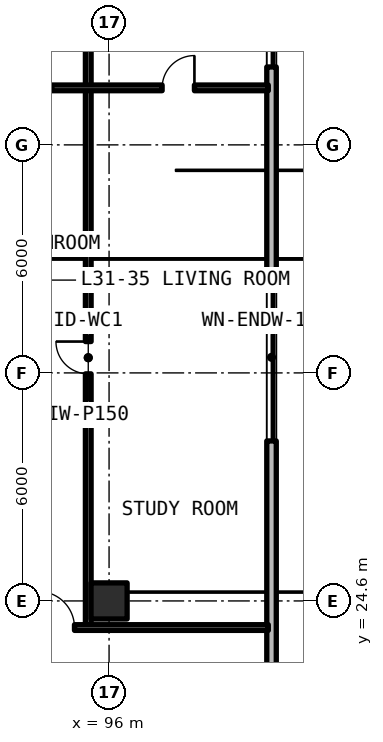
"""IFC4 building model, lengths in metres.
Left out: names, types, materials, properties, quantities, classifications, styles, units other than length and angle.
Written with IfcOpenShell. Run it as: python <this file> out.ifc"""

import sys

from ifc_helpers import new_model, si_unit, direction, frame, frame_2d, origin, origin_2d, place, context, subcontext, project, spatial, rectangle, extrude, element, fill, save


model = new_model("IFC4")
c1 = context("Model", 3, precision=1e-05, world=origin(), true_north=direction((0.0, 1.0)))
c2 = subcontext(c1, "Body", "Model", "MODEL_VIEW")
j1 = project(units=[si_unit("LENGTHUNIT", "METRE"), si_unit("PLANEANGLEUNIT", "RADIAN")], contexts=[c1])
p1 = place(None, origin())
s1 = spatial("IfcSite", under=j1, at=p1, CompositionType="ELEMENT")
p2 = place(p1, origin())
s2 = spatial("IfcBuilding", under=s1, at=p2, CompositionType="ELEMENT")
p3 = place(p2, frame((0.0, 0.0, 112.2)))
s3 = spatial("IfcBuildingStorey", under=s2, at=p3, CompositionType="ELEMENT", Elevation=112.2)
p4 = place(p3, frame((96.0, 24.6, 0.0), z_axis=(0.0, 0.0, 1.0), x_axis=(1.0, 0.0, 0.0)))
e1 = element("IfcColumn", 1, at=p4, inside=s3, PredefinedType="COLUMN", context=c2, shape_type="SweptSolid", body=[
    extrude(rectangle(XDim=0.95, YDim=0.95, at=origin_2d()), origin(), (0.0, 0.0, 1.0), 3.63),
])
p5 = place(p3, frame((100.275, 13.852, 0.0), z_axis=(0.0, 0.0, 1.0), x_axis=(0.0, 1.0, 0.0)))
e2 = element("IfcWall", 2, at=p5, inside=s3, PredefinedType="SOLIDWALL", context=c2, shape_type="SweptSolid", body=[
    extrude(rectangle(XDim=39.496, YDim=0.25, at=frame_2d((19.748, 0.0))), origin(), (0.0, 0.0, 1.0), 3.41),
])
p6 = place(p5, frame((14.958, 0.0, 0.78)))
e3 = element("IfcOpeningElement", 3, at=p6, cuts=e2, PredefinedType="OPENING", context=c2, shape_type="SweptSolid", body=[
    extrude(rectangle(XDim=4.4, YDim=1.66, at=frame_2d((2.2, 0.83))), frame((0.0, 0.135, 0.0), z_axis=(0.0, -1.0, 0.0), x_axis=(1.0, 0.0, 0.0)), (0.0, 0.0, 1.0), 0.27),
])
p7 = place(p5, frame((24.798, 0.0, 0.78)))
e4 = element("IfcOpeningElement", 4, at=p7, cuts=e2, PredefinedType="OPENING", context=c2, shape_type="SweptSolid", body=[
    extrude(rectangle(XDim=4.4, YDim=1.66, at=frame_2d((2.2, 0.83))), frame((0.0, 0.135, 0.0), z_axis=(0.0, -1.0, 0.0), x_axis=(1.0, 0.0, 0.0)), (0.0, 0.0, 1.0), 0.27),
])
p8 = place(p5, frame((5.604, 0.0, 0.78)))
e5 = element("IfcOpeningElement", 5, at=p8, cuts=e2, PredefinedType="OPENING", context=c2, shape_type="SweptSolid", body=[
    extrude(rectangle(XDim=1.4, YDim=1.65, at=frame_2d((0.7, 0.825))), frame((0.0, 0.135, 0.0), z_axis=(0.0, -1.0, 0.0), x_axis=(1.0, 0.0, 0.0)), (0.0, 0.0, 1.0), 0.27),
])
p9 = place(p3, frame((95.452, 23.9, 0.0), z_axis=(0.0, 0.0, 1.0), x_axis=(0.0, 1.0, 0.0)))
e6 = element("IfcWall", 6, at=p9, inside=s3, PredefinedType="PARTITIONING", context=c2, shape_type="SweptSolid", body=[
    extrude(rectangle(XDim=14.2, YDim=0.15, at=frame_2d((7.1, 0.0))), origin(), (0.0, 0.0, 1.0), 2.63),
])
p10 = place(p9, frame((6.675, 0.0, 0.0)))
e7 = element("IfcOpeningElement", 7, at=p10, cuts=e6, PredefinedType="OPENING", context=c2, shape_type="SweptSolid", body=[
    extrude(rectangle(XDim=0.85, YDim=2.1, at=frame_2d((0.425, 1.05))), frame((0.0, 0.085, 0.0), z_axis=(0.0, -1.0, 0.0), x_axis=(1.0, 0.0, 0.0)), (0.0, 0.0, 1.0), 0.17),
])
p11 = place(p3, frame((95.452, 38.1, 0.0), z_axis=(0.0, 0.0, 1.0), x_axis=(0.0, 1.0, 0.0)))
e8 = element("IfcWall", 8, at=p11, inside=s3, PredefinedType="PARTITIONING", context=c2, shape_type="SweptSolid", body=[
    extrude(rectangle(XDim=5.2, YDim=0.15, at=frame_2d((2.6, 0.0))), origin(), (0.0, 0.0, 1.0), 2.63),
])
p12 = place(p3, frame((90.32, 38.1, 0.0), z_axis=(0.0, 0.0, 1.0), x_axis=(1.0, 0.0, 0.0)))
e9 = element("IfcWall", 9, at=p12, inside=s3, PredefinedType="PARTITIONING", context=c2, shape_type="SweptSolid", body=[
    extrude(rectangle(XDim=9.87, YDim=0.15, at=frame_2d((4.935, 0.0))), origin(), (0.0, 0.0, 1.0), 2.63),
])
p13 = place(p12, frame((3.316, 0.0, 0.0)))
e10 = element("IfcOpeningElement", 10, at=p13, cuts=e9, PredefinedType="OPENING", context=c2, shape_type="SweptSolid", body=[
    extrude(rectangle(XDim=0.85, YDim=2.1, at=frame_2d((0.425, 1.05))), frame((0.0, 0.085, 0.0), z_axis=(0.0, -1.0, 0.0), x_axis=(1.0, 0.0, 0.0)), (0.0, 0.0, 1.0), 0.17),
])
p14 = place(p12, frame((7.076, 0.0, 0.0)))
e11 = element("IfcOpeningElement", 11, at=p14, cuts=e9, PredefinedType="OPENING", context=c2, shape_type="SweptSolid", body=[
    extrude(rectangle(XDim=0.85, YDim=2.1, at=frame_2d((0.425, 1.05))), frame((0.0, 0.085, 0.0), z_axis=(0.0, -1.0, 0.0), x_axis=(1.0, 0.0, 0.0)), (0.0, 0.0, 1.0), 0.17),
])
p15 = place(p3, frame((90.32, 23.9, 0.0), z_axis=(0.0, 0.0, 1.0), x_axis=(1.0, 0.0, 0.0)))
e12 = element("IfcWall", 12, at=p15, inside=s3, PredefinedType="SOLIDWALL", context=c2, shape_type="SweptSolid", body=[
    extrude(rectangle(XDim=9.87, YDim=0.15, at=frame_2d((4.935, 0.0))), origin(), (0.0, 0.0, 1.0), 2.63),
])
p16 = place(p15, frame((3.82, 0.0, 0.0)))
e13 = element("IfcOpeningElement", 13, at=p16, cuts=e12, PredefinedType="OPENING", context=c2, shape_type="SweptSolid", body=[
    extrude(rectangle(XDim=0.95, YDim=2.15, at=frame_2d((0.475, 1.075))), frame((0.0, 0.085, 0.0), z_axis=(0.0, -1.0, 0.0), x_axis=(1.0, 0.0, 0.0)), (0.0, 0.0, 1.0), 0.17),
])
p17 = place(p6, origin())
e14 = element("IfcWindow", 14, at=p17, inside=s3, PartitioningType="SINGLE_PANEL", PredefinedType="WINDOW", context=c2, shape_type="SweptSolid", body=[
    extrude(rectangle(XDim=4.4, YDim=1.66, at=frame_2d((2.2, 0.83))), frame((0.0, 0.03, 0.0), z_axis=(0.0, -1.0, 0.0), x_axis=(1.0, 0.0, 0.0)), (0.0, 0.0, 1.0), 0.06),
])
fill(e3, e14)
p18 = place(p7, origin())
e15 = element("IfcWindow", 15, at=p18, inside=s3, PartitioningType="SINGLE_PANEL", PredefinedType="WINDOW", context=c2, shape_type="SweptSolid", body=[
    extrude(rectangle(XDim=4.4, YDim=1.66, at=frame_2d((2.2, 0.83))), frame((0.0, 0.03, 0.0), z_axis=(0.0, -1.0, 0.0), x_axis=(1.0, 0.0, 0.0)), (0.0, 0.0, 1.0), 0.06),
])
fill(e4, e15)
p19 = place(p10, origin())
e16 = element("IfcDoor", 16, at=p19, inside=s3, OperationType="SINGLE_SWING_RIGHT", PredefinedType="DOOR", context=c2, shape_type="SweptSolid", body=[
    extrude(rectangle(XDim=0.85, YDim=2.1, at=frame_2d((0.425, 1.05))), frame((0.0, 0.025, 0.0), z_axis=(0.0, -1.0, 0.0), x_axis=(1.0, 0.0, 0.0)), (0.0, 0.0, 1.0), 0.05),
])
fill(e7, e16)
p20 = place(p14, origin())
e17 = element("IfcDoor", 17, at=p20, inside=s3, OperationType="SINGLE_SWING_RIGHT", PredefinedType="DOOR", context=c2, shape_type="SweptSolid", body=[
    extrude(rectangle(XDim=0.85, YDim=2.1, at=frame_2d((0.425, 1.05))), frame((0.0, 0.025, 0.0), z_axis=(0.0, -1.0, 0.0), x_axis=(1.0, 0.0, 0.0)), (0.0, 0.0, 1.0), 0.05),
])
fill(e11, e17)
p21 = place(p16, origin())
e18 = element("IfcDoor", 18, at=p21, inside=s3, OperationType="SINGLE_SWING_LEFT", PredefinedType="DOOR", context=c2, shape_type="SweptSolid", body=[
    extrude(rectangle(XDim=0.95, YDim=2.15, at=frame_2d((0.475, 1.075))), frame((0.0, 0.025, 0.0), z_axis=(0.0, -1.0, 0.0), x_axis=(1.0, 0.0, 0.0)), (0.0, 0.0, 1.0), 0.05),
])
fill(e13, e18)
save(model, sys.argv[1])
